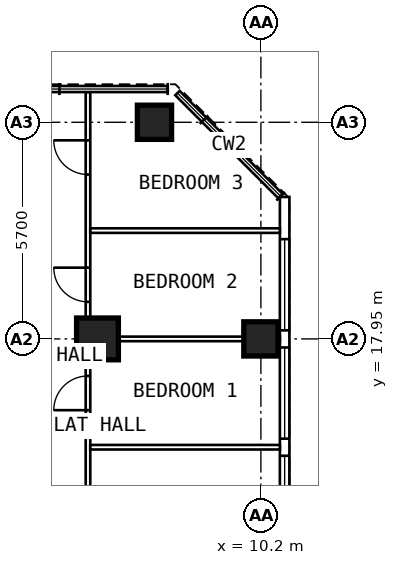
"""IFC4 building model, lengths in metres.
Left out: names, types, materials, properties, quantities, classifications, styles, units other than length and angle.
Written with IfcOpenShell. Run it as: python <this file> out.ifc"""

import sys

from ifc_helpers import new_model, si_unit, direction, frame, frame_2d, origin, origin_2d, place, context, subcontext, project, spatial, rectangle, extrude, element, fill, save


model = new_model("IFC4")
c1 = context("Model", 3, precision=1e-05, world=origin(), true_north=direction((0.0, 1.0)))
c2 = subcontext(c1, "Body", "Model", "MODEL_VIEW")
j1 = project(units=[si_unit("LENGTHUNIT", "METRE"), si_unit("PLANEANGLEUNIT", "RADIAN")], contexts=[c1])
p1 = place(None, origin())
s1 = spatial("IfcSite", under=j1, at=p1, CompositionType="ELEMENT")
p2 = place(p1, origin())
s2 = spatial("IfcBuilding", under=s1, at=p2, CompositionType="ELEMENT")
p3 = place(p2, frame((0.0, 0.0, 219.0)))
s3 = spatial("IfcBuildingStorey", under=s2, at=p3, CompositionType="ELEMENT", Elevation=219.0)
for number, where, z_axis, x_axis in (
    (1, (10.2, 17.95, 0.0), (0.0, 0.0, 1.0), (0.0, 1.0, 0.0)),
    (2, (7.4, 23.65, 0.0), (0.0, 0.0, 1.0), (0.0, 1.0, 0.0)),
):
    element("IfcColumn", number, at=place(p3, frame(where, z_axis=z_axis, x_axis=x_axis)), inside=s3, PredefinedType="COLUMN", context=c2, shape_type="SweptSolid", body=[
        extrude(rectangle(XDim=0.9, YDim=0.9, at=origin_2d()), origin(), (0.0, 0.0, 1.0), 3.6),
    ])
p4 = place(p3, frame((5.9, 17.95, 0.0), z_axis=(0.0, 0.0, 1.0), x_axis=(0.0, 1.0, 0.0)))
e3 = element("IfcColumn", 3, at=p4, inside=s3, PredefinedType="COLUMN", context=c2, shape_type="SweptSolid", body=[
    extrude(rectangle(XDim=1.1, YDim=1.1, at=origin_2d()), origin(), (0.0, 0.0, 1.0), 3.6),
])
p5 = place(p3, frame((10.825, 6.409, 0.0), z_axis=(0.0, 0.0, 1.0), x_axis=(0.0, 1.0, 0.0)))
e4 = element("IfcWall", 4, at=p5, inside=s3, PredefinedType="SOLIDWALL", context=c2, shape_type="SweptSolid", body=[
    extrude(rectangle(XDim=15.276, YDim=0.25, at=frame_2d((7.638, 0.0))), origin(), (0.0, 0.0, 1.0), 3.35),
])
p6 = place(p5, frame((0.366, 0.0, 0.8)))
e5 = element("IfcOpeningElement", 5, at=p6, cuts=e4, PredefinedType="OPENING", context=c2, shape_type="SweptSolid", body=[
    extrude(rectangle(XDim=2.4, YDim=1.8, at=frame_2d((1.2, 0.9))), frame((0.0, 0.137, 0.0), z_axis=(0.0, -1.0, 0.0), x_axis=(1.0, 0.0, 0.0)), (0.0, 0.0, 1.0), 0.274),
])
p7 = place(p5, frame((3.216, 0.0, 0.8)))
e6 = element("IfcOpeningElement", 6, at=p7, cuts=e4, PredefinedType="OPENING", context=c2, shape_type="SweptSolid", body=[
    extrude(rectangle(XDim=2.4, YDim=1.8, at=frame_2d((1.2, 0.9))), frame((0.0, 0.137, 0.0), z_axis=(0.0, -1.0, 0.0), x_axis=(1.0, 0.0, 0.0)), (0.0, 0.0, 1.0), 0.274),
])
p8 = place(p5, frame((6.066, 0.0, 0.8)))
e7 = element("IfcOpeningElement", 7, at=p8, cuts=e4, PredefinedType="OPENING", context=c2, shape_type="SweptSolid", body=[
    extrude(rectangle(XDim=2.4, YDim=1.8, at=frame_2d((1.2, 0.9))), frame((0.0, 0.137, 0.0), z_axis=(0.0, -1.0, 0.0), x_axis=(1.0, 0.0, 0.0)), (0.0, 0.0, 1.0), 0.274),
])
p9 = place(p5, frame((8.916, 0.0, 0.8)))
e8 = element("IfcOpeningElement", 8, at=p9, cuts=e4, PredefinedType="OPENING", context=c2, shape_type="SweptSolid", body=[
    extrude(rectangle(XDim=2.4, YDim=1.8, at=frame_2d((1.2, 0.9))), frame((0.0, 0.137, 0.0), z_axis=(0.0, -1.0, 0.0), x_axis=(1.0, 0.0, 0.0)), (0.0, 0.0, 1.0), 0.274),
])
p10 = place(p5, frame((11.766, 0.0, 0.8)))
e9 = element("IfcOpeningElement", 9, at=p10, cuts=e4, PredefinedType="OPENING", context=c2, shape_type="SweptSolid", body=[
    extrude(rectangle(XDim=2.4, YDim=1.8, at=frame_2d((1.2, 0.9))), frame((0.0, 0.137, 0.0), z_axis=(0.0, -1.0, 0.0), x_axis=(1.0, 0.0, 0.0)), (0.0, 0.0, 1.0), 0.274),
])
p11 = place(p3, frame((5.65, 9.6, 0.0), z_axis=(0.0, 0.0, 1.0), x_axis=(0.0, 1.0, 0.0)))
e10 = element("IfcWall", 10, at=p11, inside=s3, PredefinedType="PARTITIONING", context=c2, shape_type="SweptSolid", body=[
    extrude(rectangle(XDim=14.845, YDim=0.12, at=frame_2d((7.422, 0.0))), origin(), (0.0, 0.0, 1.0), 3.35),
])
p12 = place(p11, frame((3.35, 0.0, 0.0)))
e11 = element("IfcOpeningElement", 11, at=p12, cuts=e10, PredefinedType="OPENING", context=c2, shape_type="SweptSolid", body=[
    extrude(rectangle(XDim=0.9, YDim=2.1, at=frame_2d((0.45, 1.05))), frame((0.0, 0.072, 0.0), z_axis=(0.0, -1.0, 0.0), x_axis=(1.0, 0.0, 0.0)), (0.0, 0.0, 1.0), 0.144),
])
p13 = place(p11, frame((6.475, 0.0, 0.0)))
e12 = element("IfcOpeningElement", 12, at=p13, cuts=e10, PredefinedType="OPENING", context=c2, shape_type="SweptSolid", body=[
    extrude(rectangle(XDim=0.9, YDim=2.1, at=frame_2d((0.45, 1.05))), frame((0.0, 0.072, 0.0), z_axis=(0.0, -1.0, 0.0), x_axis=(1.0, 0.0, 0.0)), (0.0, 0.0, 1.0), 0.144),
])
p14 = place(p11, frame((9.325, 0.0, 0.0)))
e13 = element("IfcOpeningElement", 13, at=p14, cuts=e10, PredefinedType="OPENING", context=c2, shape_type="SweptSolid", body=[
    extrude(rectangle(XDim=0.9, YDim=2.1, at=frame_2d((0.45, 1.05))), frame((0.0, 0.072, 0.0), z_axis=(0.0, -1.0, 0.0), x_axis=(1.0, 0.0, 0.0)), (0.0, 0.0, 1.0), 0.144),
])
p15 = place(p11, frame((12.675, 0.0, 0.0)))
e14 = element("IfcOpeningElement", 14, at=p15, cuts=e10, PredefinedType="OPENING", context=c2, shape_type="SweptSolid", body=[
    extrude(rectangle(XDim=0.9, YDim=2.1, at=frame_2d((0.45, 1.05))), frame((0.0, 0.072, 0.0), z_axis=(0.0, -1.0, 0.0), x_axis=(1.0, 0.0, 0.0)), (0.0, 0.0, 1.0), 0.144),
])
p16 = place(p3, frame((5.71, 15.1, 0.0), z_axis=(0.0, 0.0, 1.0), x_axis=(1.0, 0.0, 0.0)))
e15 = element("IfcWall", 15, at=p16, inside=s3, PredefinedType="PARTITIONING", context=c2, shape_type="SweptSolid", body=[
    extrude(rectangle(XDim=4.99, YDim=0.12, at=frame_2d((2.495, 0.0))), origin(), (0.0, 0.0, 1.0), 3.35),
])
p17 = place(p3, frame((5.71, 17.95, 0.0), z_axis=(0.0, 0.0, 1.0), x_axis=(1.0, 0.0, 0.0)))
e16 = element("IfcWall", 16, at=p17, inside=s3, PredefinedType="PARTITIONING", context=c2, shape_type="SweptSolid", body=[
    extrude(rectangle(XDim=4.99, YDim=0.12, at=frame_2d((2.495, 0.0))), origin(), (0.0, 0.0, 1.0), 2.45),
])
p18 = place(p3, frame((5.71, 20.8, 0.0), z_axis=(0.0, 0.0, 1.0), x_axis=(1.0, 0.0, 0.0)))
e17 = element("IfcWall", 17, at=p18, inside=s3, PredefinedType="PARTITIONING", context=c2, shape_type="SweptSolid", body=[
    extrude(rectangle(XDim=4.99, YDim=0.12, at=frame_2d((2.495, 0.0))), origin(), (0.0, 0.0, 1.0), 3.35),
])
p19 = place(p8, origin())
e18 = element("IfcWindow", 18, at=p19, inside=s3, PartitioningType="SINGLE_PANEL", PredefinedType="WINDOW", context=c2, shape_type="SweptSolid", body=[
    extrude(rectangle(XDim=2.4, YDim=1.8, at=frame_2d((1.2, 0.9))), frame((0.0, 0.03, 0.0), z_axis=(0.0, -1.0, 0.0), x_axis=(1.0, 0.0, 0.0)), (0.0, 0.0, 1.0), 0.06),
])
fill(e7, e18)
p20 = place(p9, origin())
e19 = element("IfcWindow", 19, at=p20, inside=s3, PartitioningType="SINGLE_PANEL", PredefinedType="WINDOW", context=c2, shape_type="SweptSolid", body=[
    extrude(rectangle(XDim=2.4, YDim=1.8, at=frame_2d((1.2, 0.9))), frame((0.0, 0.03, 0.0), z_axis=(0.0, -1.0, 0.0), x_axis=(1.0, 0.0, 0.0)), (0.0, 0.0, 1.0), 0.06),
])
fill(e8, e19)
p21 = place(p10, origin())
e20 = element("IfcWindow", 20, at=p21, inside=s3, PartitioningType="SINGLE_PANEL", PredefinedType="WINDOW", context=c2, shape_type="SweptSolid", body=[
    extrude(rectangle(XDim=2.4, YDim=1.8, at=frame_2d((1.2, 0.9))), frame((0.0, 0.03, 0.0), z_axis=(0.0, -1.0, 0.0), x_axis=(1.0, 0.0, 0.0)), (0.0, 0.0, 1.0), 0.06),
])
fill(e9, e20)
p22 = place(p13, origin())
e21 = element("IfcDoor", 21, at=p22, inside=s3, OperationType="SINGLE_SWING_LEFT", PredefinedType="DOOR", context=c2, shape_type="SweptSolid", body=[
    extrude(rectangle(XDim=0.9, YDim=2.1, at=frame_2d((0.45, 1.05))), frame((0.0, 0.025, 0.0), z_axis=(0.0, -1.0, 0.0), x_axis=(1.0, 0.0, 0.0)), (0.0, 0.0, 1.0), 0.05),
])
fill(e12, e21)
p23 = place(p14, origin())
e22 = element("IfcDoor", 22, at=p23, inside=s3, OperationType="SINGLE_SWING_RIGHT", PredefinedType="DOOR", context=c2, shape_type="SweptSolid", body=[
    extrude(rectangle(XDim=0.9, YDim=2.1, at=frame_2d((0.45, 1.05))), frame((0.0, 0.025, 0.0), z_axis=(0.0, -1.0, 0.0), x_axis=(1.0, 0.0, 0.0)), (0.0, 0.0, 1.0), 0.05),
])
fill(e13, e22)
p24 = place(p15, origin())
e23 = element("IfcDoor", 23, at=p24, inside=s3, OperationType="SINGLE_SWING_RIGHT", PredefinedType="DOOR", context=c2, shape_type="SweptSolid", body=[
    extrude(rectangle(XDim=0.9, YDim=2.1, at=frame_2d((0.45, 1.05))), frame((0.0, 0.025, 0.0), z_axis=(0.0, -1.0, 0.0), x_axis=(1.0, 0.0, 0.0)), (0.0, 0.0, 1.0), 0.05),
])
fill(e14, e23)
save(model, sys.argv[1])
